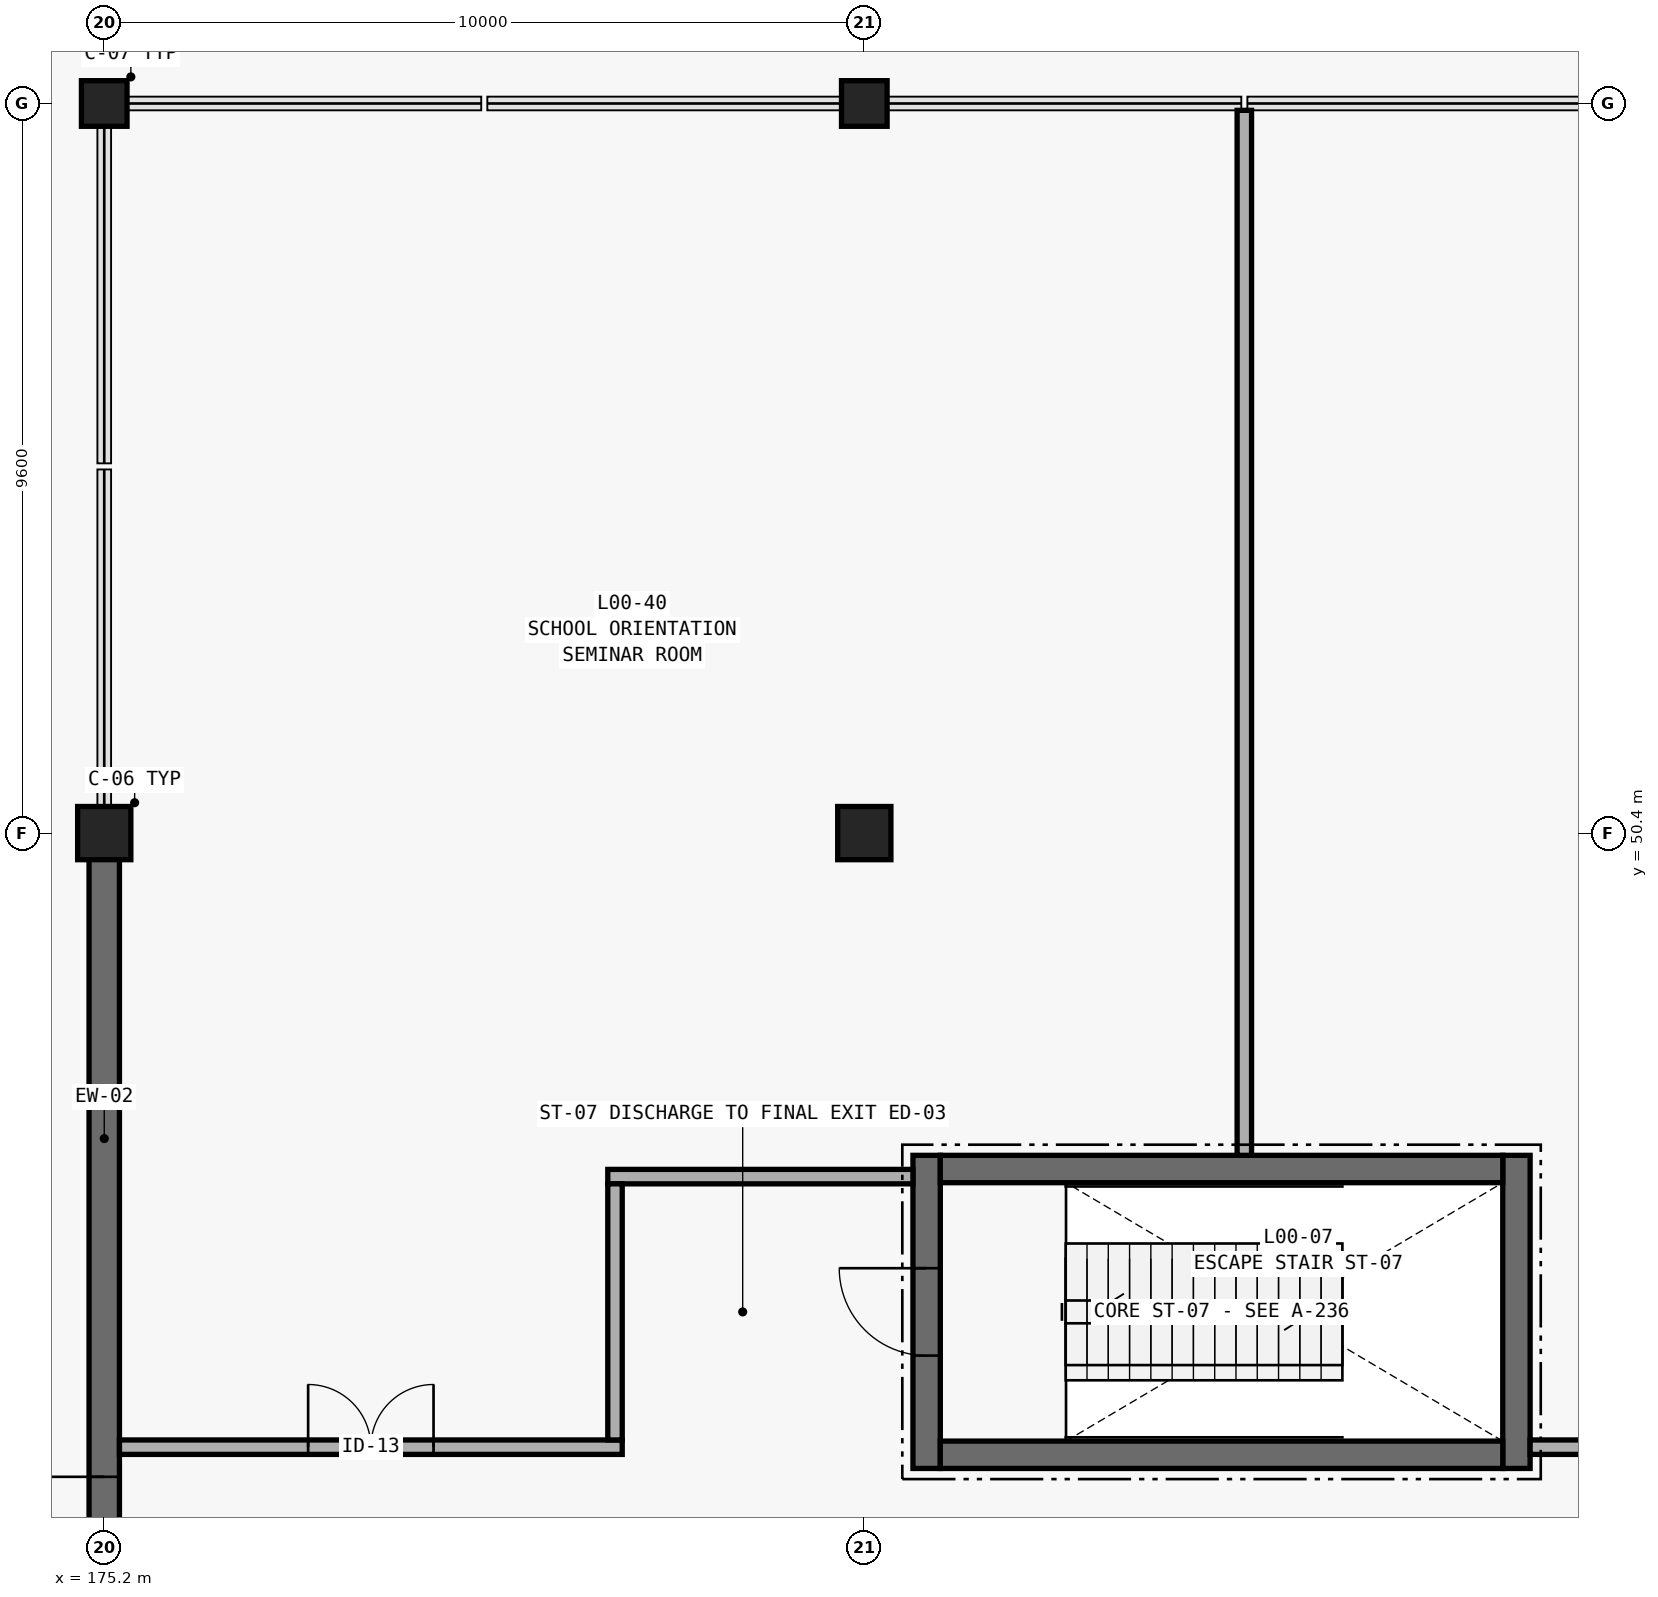
"""IFC4 building model, lengths in metres.
Left out: names, types, materials, properties, quantities, classifications, styles, units other than length and angle.
Written with IfcOpenShell. Run it as: python <this file> out.ifc"""

import sys

from ifc_helpers import new_model, si_unit, direction, frame, frame_2d, origin, origin_2d, place, context, subcontext, project, spatial, rectangle, extrude, element, fill, save


model = new_model("IFC4")
c1 = context("Model", 3, precision=1e-05, world=origin(), true_north=direction((0.0, 1.0)))
c2 = subcontext(c1, "Body", "Model", "MODEL_VIEW")
j1 = project(units=[si_unit("LENGTHUNIT", "METRE"), si_unit("PLANEANGLEUNIT", "RADIAN")], contexts=[c1])
p1 = place(None, origin())
s1 = spatial("IfcSite", under=j1, at=p1, CompositionType="ELEMENT")
p2 = place(p1, origin())
s2 = spatial("IfcBuilding", under=s1, at=p2, CompositionType="ELEMENT")
p3 = place(p2, origin())
s3 = spatial("IfcBuildingStorey", under=s2, at=p3, CompositionType="ELEMENT", Elevation=0.0)
p4 = place(p3, frame((175.2, 50.4, 0.0), z_axis=(0.0, 0.0, 1.0), x_axis=(1.0, 0.0, 0.0)))
e1 = element("IfcColumn", 1, at=p4, inside=s3, PredefinedType="COLUMN", context=c2, shape_type="SweptSolid", body=[
    extrude(rectangle(XDim=0.7, YDim=0.7, at=origin_2d()), origin(), (0.0, 0.0, 1.0), 4.8),
])
p5 = place(p3, frame((175.2, 60.0, 0.0), z_axis=(0.0, 0.0, 1.0), x_axis=(1.0, 0.0, 0.0)))
e2 = element("IfcColumn", 2, at=p5, inside=s3, PredefinedType="COLUMN", context=c2, shape_type="SweptSolid", body=[
    extrude(rectangle(XDim=0.6, YDim=0.6, at=origin_2d()), origin(), (0.0, 0.0, 1.0), 4.8),
])
p6 = place(p3, frame((185.2, 50.4, 0.0), z_axis=(0.0, 0.0, 1.0), x_axis=(1.0, 0.0, 0.0)))
e3 = element("IfcColumn", 3, at=p6, inside=s3, PredefinedType="COLUMN", context=c2, shape_type="SweptSolid", body=[
    extrude(rectangle(XDim=0.7, YDim=0.7, at=origin_2d()), origin(), (0.0, 0.0, 1.0), 4.8),
])
p7 = place(p3, frame((185.2, 60.0, 0.0), z_axis=(0.0, 0.0, 1.0), x_axis=(1.0, 0.0, 0.0)))
e4 = element("IfcColumn", 4, at=p7, inside=s3, PredefinedType="COLUMN", context=c2, shape_type="SweptSolid", body=[
    extrude(rectangle(XDim=0.6, YDim=0.6, at=origin_2d()), origin(), (0.0, 0.0, 1.0), 4.8),
])
p8 = place(p3, frame((175.2, 50.58, 0.0), z_axis=(0.0, 0.0, 1.0), x_axis=(0.0, -1.0, 0.0)))
e5 = element("IfcWall", 5, at=p8, inside=s3, PredefinedType="STANDARD", context=c2, shape_type="SweptSolid", body=[
    extrude(rectangle(XDim=12.36, YDim=0.4, at=frame_2d((6.18, 0.0))), origin(), (0.0, 0.0, 1.0), 4.5),
])
p9 = place(p8, frame((8.65, 0.0, 0.0)))
e6 = element("IfcOpeningElement", 6, at=p9, cuts=e5, PredefinedType="OPENING", context=c2, shape_type="SweptSolid", body=[
    extrude(rectangle(XDim=1.9, YDim=2.4, at=frame_2d((0.95, 1.2))), frame((0.0, 0.215, 0.0), z_axis=(0.0, -1.0, 0.0), x_axis=(1.0, 0.0, 0.0)), (0.0, 0.0, 1.0), 0.43),
])
p10 = place(p3, frame((186.02, 42.04, 0.0), z_axis=(0.0, 0.0, 1.0), x_axis=(0.0, 1.0, 0.0)))
e7 = element("IfcWall", 7, at=p10, inside=s3, PredefinedType="SHEAR", context=c2, shape_type="SweptSolid", body=[
    extrude(rectangle(XDim=4.12, YDim=0.36, at=frame_2d((2.06, 0.0))), origin(), (0.0, 0.0, 1.0), 4.5),
])
p11 = place(p10, frame((1.485, 0.0, 0.0)))
e8 = element("IfcOpeningElement", 8, at=p11, cuts=e7, PredefinedType="OPENING", context=c2, shape_type="SweptSolid", body=[
    extrude(rectangle(XDim=1.15, YDim=2.15, at=frame_2d((0.575, 1.075))), frame((0.0, 0.195, 0.0), z_axis=(0.0, -1.0, 0.0), x_axis=(1.0, 0.0, 0.0)), (0.0, 0.0, 1.0), 0.39),
])
p12 = place(p3, frame((193.78, 42.04, 0.0), z_axis=(0.0, 0.0, 1.0), x_axis=(0.0, 1.0, 0.0)))
e9 = element("IfcWall", 9, at=p12, inside=s3, PredefinedType="SHEAR", context=c2, shape_type="SweptSolid", body=[
    extrude(rectangle(XDim=4.12, YDim=0.36, at=frame_2d((2.06, 0.0))), origin(), (0.0, 0.0, 1.0), 4.5),
])
for number, where, z_axis, x_axis in (
    (10, (186.2, 45.98, 0.0), (0.0, 0.0, 1.0), (1.0, 0.0, 0.0)),
    (11, (186.2, 42.22, 0.0), (0.0, 0.0, 1.0), (1.0, 0.0, 0.0)),
):
    element("IfcWall", number, at=place(p3, frame(where, z_axis=z_axis, x_axis=x_axis)), inside=s3, PredefinedType="SHEAR", context=c2, shape_type="SweptSolid", body=[
        extrude(rectangle(XDim=7.4, YDim=0.36, at=frame_2d((3.7, 0.0))), origin(), (0.0, 0.0, 1.0), 4.5),
    ])
p13 = place(p3, frame((175.4, 42.32, 0.0), z_axis=(0.0, 0.0, 1.0), x_axis=(1.0, 0.0, 0.0)))
e12 = element("IfcWall", 12, at=p13, inside=s3, PredefinedType="PARTITIONING", context=c2, shape_type="SweptSolid", body=[
    extrude(rectangle(XDim=6.615, YDim=0.19, at=frame_2d((3.308, 0.0))), origin(), (0.0, 0.0, 1.0), 3.38),
])
p14 = place(p13, frame((2.482, 0.0, 0.0)))
e13 = element("IfcOpeningElement", 13, at=p14, cuts=e12, PredefinedType="OPENING", context=c2, shape_type="SweptSolid", body=[
    extrude(rectangle(XDim=1.65, YDim=2.25, at=frame_2d((0.825, 1.125))), frame((0.0, 0.11, 0.0), z_axis=(0.0, -1.0, 0.0), x_axis=(1.0, 0.0, 0.0)), (0.0, 0.0, 1.0), 0.22),
])
p15 = place(p3, frame((193.96, 42.32, 0.0), z_axis=(0.0, 0.0, 1.0), x_axis=(1.0, 0.0, 0.0)))
e14 = element("IfcWall", 14, at=p15, inside=s3, PredefinedType="PARTITIONING", context=c2, shape_type="SweptSolid", body=[
    extrude(rectangle(XDim=11.15, YDim=0.19, at=frame_2d((5.575, 0.0))), origin(), (0.0, 0.0, 1.0), 3.38),
])
p16 = place(p15, frame((4.475, 0.0, 0.0)))
e15 = element("IfcOpeningElement", 15, at=p16, cuts=e14, PredefinedType="OPENING", context=c2, shape_type="SweptSolid", body=[
    extrude(rectangle(XDim=2.2, YDim=2.45, at=frame_2d((1.1, 1.225))), frame((0.0, 0.11, 0.0), z_axis=(0.0, -1.0, 0.0), x_axis=(1.0, 0.0, 0.0)), (0.0, 0.0, 1.0), 0.22),
])
p17 = place(p3, frame((181.825, 45.88, 0.0), z_axis=(0.0, 0.0, 1.0), x_axis=(1.0, 0.0, 0.0)))
e16 = element("IfcWall", 16, at=p17, inside=s3, PredefinedType="PARTITIONING", context=c2, shape_type="SweptSolid", body=[
    extrude(rectangle(XDim=4.015, YDim=0.19, at=frame_2d((2.008, 0.0))), origin(), (0.0, 0.0, 1.0), 3.38),
])
p18 = place(p3, frame((181.92, 42.415, 0.0), z_axis=(0.0, 0.0, 1.0), x_axis=(0.0, 1.0, 0.0)))
e17 = element("IfcWall", 17, at=p18, inside=s3, PredefinedType="PARTITIONING", context=c2, shape_type="SweptSolid", body=[
    extrude(rectangle(XDim=3.37, YDim=0.19, at=frame_2d((1.685, 0.0))), origin(), (0.0, 0.0, 1.0), 3.38),
])
p19 = place(p3, frame((190.2, 46.16, 0.0), z_axis=(0.0, 0.0, 1.0), x_axis=(0.0, 1.0, 0.0)))
e18 = element("IfcWall", 18, at=p19, inside=s3, PredefinedType="PARTITIONING", context=c2, shape_type="SweptSolid", body=[
    extrude(rectangle(XDim=13.75, YDim=0.19, at=frame_2d((6.875, 0.0))), origin(), (0.0, 0.0, 1.0), 3.38),
])
p20 = place(p9, frame((1.9, 0.0, 0.0), z_axis=(0.0, 0.0, 1.0), x_axis=(-1.0, 0.0, 0.0)))
e19 = element("IfcDoor", 19, at=p20, inside=s3, OperationType="DOUBLE_DOOR_SINGLE_SWING", PredefinedType="DOOR", context=c2, shape_type="SweptSolid", body=[
    extrude(rectangle(XDim=1.9, YDim=2.4, at=frame_2d((0.95, 1.2))), frame((0.0, 0.025, 0.0), z_axis=(0.0, -1.0, 0.0), x_axis=(1.0, 0.0, 0.0)), (0.0, 0.0, 1.0), 0.05),
])
fill(e6, e19)
p21 = place(p11, origin())
e20 = element("IfcDoor", 20, at=p21, inside=s3, OperationType="SINGLE_SWING_RIGHT", PredefinedType="DOOR", context=c2, shape_type="SweptSolid", body=[
    extrude(rectangle(XDim=1.15, YDim=2.15, at=frame_2d((0.575, 1.075))), frame((0.0, 0.025, 0.0), z_axis=(0.0, -1.0, 0.0), x_axis=(1.0, 0.0, 0.0)), (0.0, 0.0, 1.0), 0.05),
])
fill(e8, e20)
p22 = place(p14, origin())
e21 = element("IfcDoor", 21, at=p22, inside=s3, OperationType="DOUBLE_DOOR_SINGLE_SWING", PredefinedType="DOOR", context=c2, shape_type="SweptSolid", body=[
    extrude(rectangle(XDim=1.65, YDim=2.25, at=frame_2d((0.825, 1.125))), frame((0.0, 0.025, 0.0), z_axis=(0.0, -1.0, 0.0), x_axis=(1.0, 0.0, 0.0)), (0.0, 0.0, 1.0), 0.05),
])
fill(e13, e21)
save(model, sys.argv[1])
